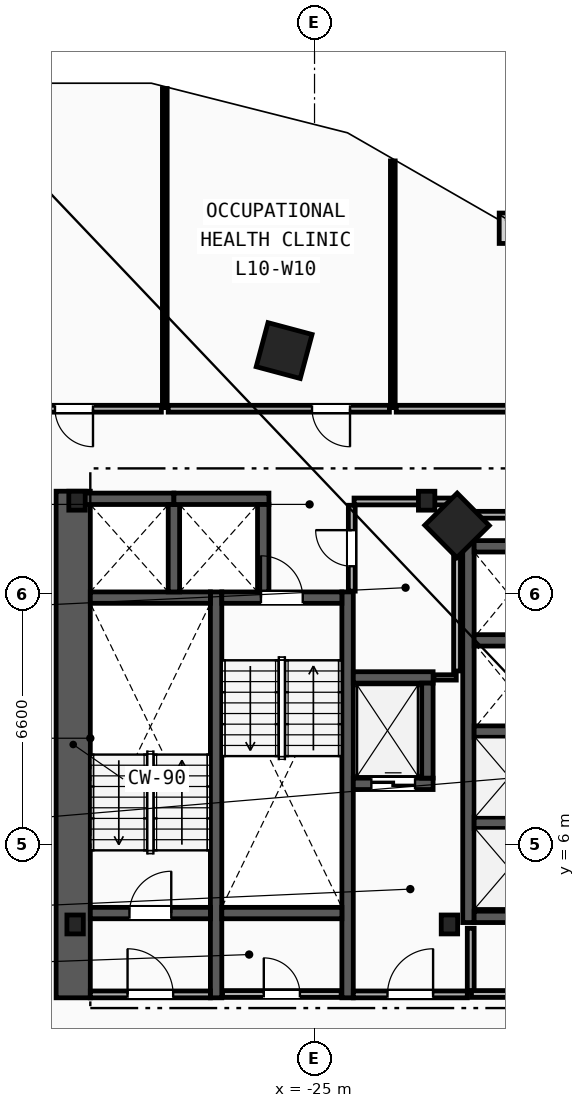
"""IFC4 building model, lengths in metres.
Left out: names, types, materials, properties, quantities, classifications, styles, units other than length and angle.
Written with IfcOpenShell. Run it as: python <this file> out.ifc"""

import sys

from ifc_helpers import new_model, si_unit, direction, frame, frame_2d, origin, origin_2d, place, context, subcontext, project, spatial, rectangle, i_section, extrude, element, fill, save


model = new_model("IFC4")
c1 = context("Model", 3, precision=1e-05, world=origin(), true_north=direction((0.0, 1.0)))
c2 = subcontext(c1, "Body", "Model", "MODEL_VIEW")
j1 = project(units=[si_unit("LENGTHUNIT", "METRE"), si_unit("PLANEANGLEUNIT", "RADIAN")], contexts=[c1])
p1 = place(None, origin())
s1 = spatial("IfcSite", under=j1, at=p1, CompositionType="ELEMENT")
p2 = place(p1, origin())
s2 = spatial("IfcBuilding", under=s1, at=p2, CompositionType="ELEMENT")
p3 = place(p2, frame((0.0, 0.0, 43.0)))
s3 = spatial("IfcBuildingStorey", under=s2, at=p3, CompositionType="ELEMENT", Elevation=43.0)
for number, where, z_axis, x_axis in (
    (1, (-31.3, 3.9, 0.0), (0.0, 0.0, 1.0), (1.0, 0.0, 0.0)),
    (2, (-21.45, 3.9, 0.0), (0.0, 0.0, 1.0), (1.0, 0.0, 0.0)),
    (3, (-22.05, 15.05, 0.0), (0.0, 0.0, 1.0), (1.0, 0.0, 0.0)),
    (4, (-31.25, 15.05, 0.0), (0.0, 0.0, 1.0), (1.0, 0.0, 0.0)),
):
    element("IfcColumn", number, at=place(p3, frame(where, z_axis=z_axis, x_axis=x_axis)), inside=s3, PredefinedType="COLUMN", context=c2, shape_type="SweptSolid", body=[
        extrude(i_section(OverallWidth=0.432, OverallDepth=0.498, WebThickness=0.056, FlangeThickness=0.089, FilletRadius=0.018, at=origin_2d()), origin(), (0.0, 0.0, 1.0), 3.8),
    ])
for number, where, z_axis, x_axis in (
    (5, (-21.25, 14.4, 0.0), (0.0, 0.0, 1.0), (-0.703, 0.711, 0.0)),
    (6, (-25.8, 19.0, 0.0), (0.0, 0.0, 1.0), (-0.966, 0.259, 0.0)),
):
    element("IfcColumn", number, at=place(p3, frame(where, z_axis=z_axis, x_axis=x_axis)), inside=s3, PredefinedType="COLUMN", context=c2, shape_type="SweptSolid", body=[
        extrude(rectangle(XDim=1.2, YDim=1.2, at=origin_2d()), origin(), (0.0, 0.0, 1.0), 3.8),
    ])
p4 = place(p3, frame((-31.35, 1.97, 0.0), z_axis=(0.0, 0.0, 1.0), x_axis=(0.0, 1.0, 0.0)))
e7 = element("IfcWall", 7, at=p4, inside=s3, PredefinedType="SHEAR", context=c2, shape_type="SweptSolid", body=[
    extrude(rectangle(XDim=13.33, YDim=0.9, at=frame_2d((6.665, 0.0))), origin(), (0.0, 0.0, 1.0), 3.5),
])
for number, where, z_axis, x_axis in (
    (8, (-27.59, 1.97, 0.0), (0.0, 0.0, 1.0), (0.0, 1.0, 0.0)),
    (9, (-24.13, 1.97, 0.0), (0.0, 0.0, 1.0), (0.0, 1.0, 0.0)),
):
    element("IfcWall", number, at=place(p3, frame(where, z_axis=z_axis, x_axis=x_axis)), inside=s3, PredefinedType="SHEAR", context=c2, shape_type="SweptSolid", body=[
        extrude(rectangle(XDim=10.68, YDim=0.3, at=frame_2d((5.34, 0.0))), origin(), (0.0, 0.0, 1.0), 3.5),
    ])
p5 = place(p3, frame((-30.9, 4.2, 0.0), z_axis=(0.0, 0.0, 1.0), x_axis=(1.0, 0.0, 0.0)))
e10 = element("IfcWall", 10, at=p5, inside=s3, PredefinedType="SHEAR", context=c2, shape_type="SweptSolid", body=[
    extrude(rectangle(XDim=3.16, YDim=0.3, at=frame_2d((1.58, 0.0))), origin(), (0.0, 0.0, 1.0), 3.5),
])
p6 = place(p5, frame((1.03, 0.0, 0.0)))
e11 = element("IfcOpeningElement", 11, at=p6, cuts=e10, PredefinedType="OPENING", context=c2, shape_type="SweptSolid", body=[
    extrude(rectangle(XDim=1.1, YDim=2.15, at=frame_2d((0.55, 1.075))), frame((0.0, 0.16, 0.0), z_axis=(0.0, -1.0, 0.0), x_axis=(1.0, 0.0, 0.0)), (0.0, 0.0, 1.0), 0.32),
])
p7 = place(p3, frame((-30.9, 12.5, 0.0), z_axis=(0.0, 0.0, 1.0), x_axis=(1.0, 0.0, 0.0)))
e12 = element("IfcWall", 12, at=p7, inside=s3, PredefinedType="SHEAR", context=c2, shape_type="SweptSolid", body=[
    extrude(rectangle(XDim=3.16, YDim=0.3, at=frame_2d((1.58, 0.0))), origin(), (0.0, 0.0, 1.0), 3.5),
])
p8 = place(p3, frame((-27.44, 12.5, 0.0), z_axis=(0.0, 0.0, 1.0), x_axis=(1.0, 0.0, 0.0)))
e13 = element("IfcWall", 13, at=p8, inside=s3, PredefinedType="SHEAR", context=c2, shape_type="SweptSolid", body=[
    extrude(rectangle(XDim=3.16, YDim=0.3, at=frame_2d((1.58, 0.0))), origin(), (0.0, 0.0, 1.0), 3.5),
])
p9 = place(p8, frame((1.03, 0.0, 0.0)))
e14 = element("IfcOpeningElement", 14, at=p9, cuts=e13, PredefinedType="OPENING", context=c2, shape_type="SweptSolid", body=[
    extrude(rectangle(XDim=1.1, YDim=2.15, at=frame_2d((0.55, 1.075))), frame((0.0, 0.16, 0.0), z_axis=(0.0, -1.0, 0.0), x_axis=(1.0, 0.0, 0.0)), (0.0, 0.0, 1.0), 0.32),
])
p10 = place(p3, frame((-27.44, 4.2, 0.0), z_axis=(0.0, 0.0, 1.0), x_axis=(1.0, 0.0, 0.0)))
e15 = element("IfcWall", 15, at=p10, inside=s3, PredefinedType="SHEAR", context=c2, shape_type="SweptSolid", body=[
    extrude(rectangle(XDim=3.16, YDim=0.3, at=frame_2d((1.58, 0.0))), origin(), (0.0, 0.0, 1.0), 3.5),
])
p11 = place(p3, frame((-20.89, 2.15, 0.0), z_axis=(0.0, 0.0, 1.0), x_axis=(0.0, 1.0, 0.0)))
e16 = element("IfcWall", 16, at=p11, inside=s3, PredefinedType="PARTITIONING", context=c2, shape_type="SweptSolid", body=[
    extrude(rectangle(XDim=1.65, YDim=0.18, at=frame_2d((0.825, 0.0))), origin(), (0.0, 0.0, 1.0), 3.5),
])
p12 = place(p3, frame((-23.98, 2.06, 0.0), z_axis=(0.0, 0.0, 1.0), x_axis=(1.0, 0.0, 0.0)))
e17 = element("IfcWall", 17, at=p12, inside=s3, PredefinedType="PARTITIONING", context=c2, shape_type="SweptSolid", body=[
    extrude(rectangle(XDim=3.0, YDim=0.18, at=frame_2d((1.5, 0.0))), origin(), (0.0, 0.0, 1.0), 3.5),
])
p13 = place(p12, frame((0.9, 0.0, 0.0)))
e18 = element("IfcOpeningElement", 18, at=p13, cuts=e17, PredefinedType="OPENING", context=c2, shape_type="SweptSolid", body=[
    extrude(rectangle(XDim=1.2, YDim=2.15, at=frame_2d((0.6, 1.075))), frame((0.0, 0.1, 0.0), z_axis=(0.0, -1.0, 0.0), x_axis=(1.0, 0.0, 0.0)), (0.0, 0.0, 1.0), 0.2),
])
p14 = place(p3, frame((-30.9, 2.06, 0.0), z_axis=(0.0, 0.0, 1.0), x_axis=(1.0, 0.0, 0.0)))
e19 = element("IfcWall", 19, at=p14, inside=s3, PredefinedType="PARTITIONING", context=c2, shape_type="SweptSolid", body=[
    extrude(rectangle(XDim=3.16, YDim=0.18, at=frame_2d((1.58, 0.0))), origin(), (0.0, 0.0, 1.0), 3.5),
])
p15 = place(p14, frame((0.98, 0.0, 0.0)))
e20 = element("IfcOpeningElement", 20, at=p15, cuts=e19, PredefinedType="OPENING", context=c2, shape_type="SweptSolid", body=[
    extrude(rectangle(XDim=1.2, YDim=2.15, at=frame_2d((0.6, 1.075))), frame((0.0, 0.1, 0.0), z_axis=(0.0, -1.0, 0.0), x_axis=(1.0, 0.0, 0.0)), (0.0, 0.0, 1.0), 0.2),
])
p16 = place(p3, frame((-23.98, 7.6, 0.0), z_axis=(0.0, 0.0, 1.0), x_axis=(1.0, 0.0, 0.0)))
e21 = element("IfcWall", 21, at=p16, inside=s3, PredefinedType="SHEAR", context=c2, shape_type="SweptSolid", body=[
    extrude(rectangle(XDim=2.1, YDim=0.3, at=frame_2d((1.05, 0.0))), origin(), (0.0, 0.0, 1.0), 3.5),
])
p17 = place(p16, frame((0.475, 0.0, 0.0)))
e22 = element("IfcOpeningElement", 22, at=p17, cuts=e21, PredefinedType="OPENING", context=c2, shape_type="SweptSolid", body=[
    extrude(rectangle(XDim=1.15, YDim=2.2, at=frame_2d((0.575, 1.1))), frame((0.0, 0.16, 0.0), z_axis=(0.0, -1.0, 0.0), x_axis=(1.0, 0.0, 0.0)), (0.0, 0.0, 1.0), 0.32),
])
p18 = place(p3, frame((-23.98, 10.4, 0.0), z_axis=(0.0, 0.0, 1.0), x_axis=(1.0, 0.0, 0.0)))
e23 = element("IfcWall", 23, at=p18, inside=s3, PredefinedType="SHEAR", context=c2, shape_type="SweptSolid", body=[
    extrude(rectangle(XDim=2.1, YDim=0.3, at=frame_2d((1.05, 0.0))), origin(), (0.0, 0.0, 1.0), 3.5),
])
for number, where, z_axis, x_axis in (
    (24, (-22.03, 7.75, 0.0), (0.0, 0.0, 1.0), (0.0, 1.0, 0.0)),
    (25, (-31.2, 15.1, 0.0), (0.0, 0.0, 1.0), (1.0, 0.0, 0.0)),
):
    element("IfcWall", number, at=place(p3, frame(where, z_axis=z_axis, x_axis=x_axis)), inside=s3, PredefinedType="SHEAR", context=c2, shape_type="SweptSolid", body=[
        extrude(rectangle(XDim=2.5, YDim=0.3, at=frame_2d((1.25, 0.0))), origin(), (0.0, 0.0, 1.0), 3.5),
    ])
p19 = place(p3, frame((-28.7, 12.65, 0.0), z_axis=(0.0, 0.0, 1.0), x_axis=(0.0, 1.0, 0.0)))
e26 = element("IfcWall", 26, at=p19, inside=s3, PredefinedType="SHEAR", context=c2, shape_type="SweptSolid", body=[
    extrude(rectangle(XDim=2.3, YDim=0.3, at=frame_2d((1.15, 0.0))), origin(), (0.0, 0.0, 1.0), 3.5),
])
p20 = place(p3, frame((-28.7, 15.1, 0.0), z_axis=(0.0, 0.0, 1.0), x_axis=(1.0, 0.0, 0.0)))
e27 = element("IfcWall", 27, at=p20, inside=s3, PredefinedType="SHEAR", context=c2, shape_type="SweptSolid", body=[
    extrude(rectangle(XDim=2.5, YDim=0.3, at=frame_2d((1.25, 0.0))), origin(), (0.0, 0.0, 1.0), 3.5),
])
p21 = place(p3, frame((-26.35, 12.65, 0.0), z_axis=(0.0, 0.0, 1.0), x_axis=(0.0, 1.0, 0.0)))
e28 = element("IfcWall", 28, at=p21, inside=s3, PredefinedType="SHEAR", context=c2, shape_type="SweptSolid", body=[
    extrude(rectangle(XDim=2.3, YDim=0.3, at=frame_2d((1.15, 0.0))), origin(), (0.0, 0.0, 1.0), 3.5),
])
p22 = place(p3, frame((-20.95, 3.95, 0.0), z_axis=(0.0, 0.0, 1.0), x_axis=(0.0, 1.0, 0.0)))
e29 = element("IfcWall", 29, at=p22, inside=s3, PredefinedType="SHEAR", context=c2, shape_type="SweptSolid", body=[
    extrude(rectangle(XDim=10.05, YDim=0.3, at=frame_2d((5.025, 0.0))), origin(), (0.0, 0.0, 1.0), 3.5),
])
for number, where, z_axis, x_axis in (
    (30, (-20.8, 4.1, 0.0), (0.0, 0.0, 1.0), (1.0, 0.0, 0.0)),
    (31, (-20.8, 13.85, 0.0), (0.0, 0.0, 1.0), (1.0, 0.0, 0.0)),
):
    element("IfcWall", number, at=place(p3, frame(where, z_axis=z_axis, x_axis=x_axis)), inside=s3, PredefinedType="SHEAR", context=c2, shape_type="SweptSolid", body=[
        extrude(rectangle(XDim=2.15, YDim=0.3, at=frame_2d((1.075, 0.0))), origin(), (0.0, 0.0, 1.0), 3.5),
    ])
for number, where, z_axis, x_axis in (
    (32, (-20.8, 6.575, 0.0), (0.0, 0.0, 1.0), (1.0, 0.0, 0.0)),
    (33, (-20.8, 8.975, 0.0), (0.0, 0.0, 1.0), (1.0, 0.0, 0.0)),
    (34, (-20.8, 11.375, 0.0), (0.0, 0.0, 1.0), (1.0, 0.0, 0.0)),
):
    element("IfcWall", number, at=place(p3, frame(where, z_axis=z_axis, x_axis=x_axis)), inside=s3, PredefinedType="SHEAR", context=c2, shape_type="SweptSolid", body=[
        extrude(rectangle(XDim=1.85, YDim=0.3, at=frame_2d((0.925, 0.0))), origin(), (0.0, 0.0, 1.0), 3.5),
    ])
p23 = place(p3, frame((-20.87, 2.07, 0.0), z_axis=(0.0, 0.0, 1.0), x_axis=(1.0, 0.0, 0.0)))
e35 = element("IfcWall", 35, at=p23, inside=s3, PredefinedType="PARTITIONING", context=c2, shape_type="SweptSolid", body=[
    extrude(rectangle(XDim=3.83, YDim=0.18, at=frame_2d((1.915, 0.0))), origin(), (0.0, 0.0, 1.0), 3.5),
])
p24 = place(p23, frame((1.44, 0.0, 0.0)))
e36 = element("IfcOpeningElement", 36, at=p24, cuts=e35, PredefinedType="OPENING", context=c2, shape_type="SweptSolid", body=[
    extrude(rectangle(XDim=0.95, YDim=2.1, at=frame_2d((0.475, 1.05))), frame((0.0, 0.1, 0.0), z_axis=(0.0, -1.0, 0.0), x_axis=(1.0, 0.0, 0.0)), (0.0, 0.0, 1.0), 0.2),
])
p25 = place(p3, frame((-21.86, 10.4, 0.0), z_axis=(0.0, 0.0, 1.0), x_axis=(1.0, 0.0, 0.0)))
e37 = element("IfcWall", 37, at=p25, inside=s3, PredefinedType="PARTITIONING", context=c2, shape_type="SweptSolid", body=[
    extrude(rectangle(XDim=0.59, YDim=0.14, at=frame_2d((0.295, 0.0))), origin(), (0.0, 0.0, 1.0), 3.5),
])
p26 = place(p3, frame((-21.25, 10.57, 0.0), z_axis=(0.0, 0.0, 1.0), x_axis=(0.0, 1.0, 0.0)))
e38 = element("IfcWall", 38, at=p26, inside=s3, PredefinedType="PARTITIONING", context=c2, shape_type="SweptSolid", body=[
    extrude(rectangle(XDim=4.36, YDim=0.18, at=frame_2d((2.18, 0.0))), origin(), (0.0, 0.0, 1.0), 3.5),
])
p27 = place(p3, frame((-23.96, 15.03, 0.0), z_axis=(0.0, 0.0, 1.0), x_axis=(1.0, 0.0, 0.0)))
e39 = element("IfcWall", 39, at=p27, inside=s3, PredefinedType="PARTITIONING", context=c2, shape_type="SweptSolid", body=[
    extrude(rectangle(XDim=2.61, YDim=0.18, at=frame_2d((1.305, 0.0))), origin(), (0.0, 0.0, 1.0), 2.573),
])
p28 = place(p3, frame((-27.42, 2.07, 0.0), z_axis=(0.0, 0.0, 1.0), x_axis=(1.0, 0.0, 0.0)))
e40 = element("IfcWall", 40, at=p28, inside=s3, PredefinedType="PARTITIONING", context=c2, shape_type="SweptSolid", body=[
    extrude(rectangle(XDim=3.12, YDim=0.18, at=frame_2d((1.56, 0.0))), origin(), (0.0, 0.0, 1.0), 3.5),
])
p29 = place(p28, frame((1.085, 0.0, 0.0)))
e41 = element("IfcOpeningElement", 41, at=p29, cuts=e40, PredefinedType="OPENING", context=c2, shape_type="SweptSolid", body=[
    extrude(rectangle(XDim=0.95, YDim=2.1, at=frame_2d((0.475, 1.05))), frame((0.0, 0.1, 0.0), z_axis=(0.0, -1.0, 0.0), x_axis=(1.0, 0.0, 0.0)), (0.0, 0.0, 1.0), 0.2),
])
p30 = place(p3, frame((-24.02, 12.67, 0.0), z_axis=(0.0, 0.0, 1.0), x_axis=(0.0, 1.0, 0.0)))
e42 = element("IfcWall", 42, at=p30, inside=s3, PredefinedType="PARTITIONING", context=c2, shape_type="SweptSolid", body=[
    extrude(rectangle(XDim=2.26, YDim=0.18, at=frame_2d((1.13, 0.0))), origin(), (0.0, 0.0, 1.0), 3.5),
])
p31 = place(p30, frame((0.655, 0.0, 0.0)))
e43 = element("IfcOpeningElement", 43, at=p31, cuts=e42, PredefinedType="OPENING", context=c2, shape_type="SweptSolid", body=[
    extrude(rectangle(XDim=0.95, YDim=2.1, at=frame_2d((0.475, 1.05))), frame((0.0, 0.1, 0.0), z_axis=(0.0, -1.0, 0.0), x_axis=(1.0, 0.0, 0.0)), (0.0, 0.0, 1.0), 0.2),
])
p32 = place(p3, frame((-28.94, 17.5, 0.0), z_axis=(0.0, 0.0, 1.0), x_axis=(0.0, 1.0, 0.0)))
e44 = element("IfcWall", 44, at=p32, inside=s3, PredefinedType="PARTITIONING", context=c2, shape_type="SweptSolid", body=[
    extrude(rectangle(XDim=8.395, YDim=0.125, at=frame_2d((4.197, 0.0))), origin(), (0.0, 0.0, 1.0), 3.5),
])
p33 = place(p3, frame((-22.94, 17.5, 0.0), z_axis=(0.0, 0.0, 1.0), x_axis=(0.0, 1.0, 0.0)))
e45 = element("IfcWall", 45, at=p33, inside=s3, PredefinedType="PARTITIONING", context=c2, shape_type="SweptSolid", body=[
    extrude(rectangle(XDim=6.49, YDim=0.125, at=frame_2d((3.245, 0.0))), origin(), (0.0, 0.0, 1.0), 3.5),
])
p34 = place(p3, frame((-16.822, 17.47, 0.0), z_axis=(0.0, 0.0, 1.0), x_axis=(-1.0, 0.0, 0.0)))
e46 = element("IfcWall", 46, at=p34, inside=s3, PredefinedType="PARTITIONING", context=c2, shape_type="SweptSolid", body=[
    extrude(rectangle(XDim=6.029, YDim=0.18, at=frame_2d((3.014, 0.0))), origin(), (0.0, 0.0, 1.0), 3.5),
])
p35 = place(p3, frame((-21.178, 14.68, 0.0), z_axis=(0.0, 0.0, 1.0), x_axis=(1.0, 0.0, 0.0)))
e47 = element("IfcWall", 47, at=p35, inside=s3, PredefinedType="PARTITIONING", context=c2, shape_type="SweptSolid", body=[
    extrude(rectangle(XDim=4.357, YDim=0.18, at=frame_2d((2.178, 0.0))), origin(), (0.0, 0.0, 1.0), 3.5),
])
p36 = place(p3, frame((-29.03, 17.47, 0.0), z_axis=(0.0, 0.0, 1.0), x_axis=(-1.0, 0.0, 0.0)))
e48 = element("IfcWall", 48, at=p36, inside=s3, PredefinedType="PARTITIONING", context=c2, shape_type="SweptSolid", body=[
    extrude(rectangle(XDim=4.598, YDim=0.18, at=frame_2d((2.299, 0.0))), origin(), (0.0, 0.0, 1.0), 3.5),
])
p37 = place(p36, frame((1.799, 0.0, 0.0)))
e49 = element("IfcOpeningElement", 49, at=p37, cuts=e48, PredefinedType="OPENING", context=c2, shape_type="SweptSolid", body=[
    extrude(rectangle(XDim=1.0, YDim=2.15, at=frame_2d((0.5, 1.075))), frame((0.0, 0.1, 0.0), z_axis=(0.0, -1.0, 0.0), x_axis=(1.0, 0.0, 0.0)), (0.0, 0.0, 1.0), 0.2),
])
p38 = place(p3, frame((-23.03, 17.47, 0.0), z_axis=(0.0, 0.0, 1.0), x_axis=(-1.0, 0.0, 0.0)))
e50 = element("IfcWall", 50, at=p38, inside=s3, PredefinedType="PARTITIONING", context=c2, shape_type="SweptSolid", body=[
    extrude(rectangle(XDim=5.82, YDim=0.18, at=frame_2d((2.91, 0.0))), origin(), (0.0, 0.0, 1.0), 3.5),
])
p39 = place(p38, frame((1.036, 0.0, 0.0)))
e51 = element("IfcOpeningElement", 51, at=p39, cuts=e50, PredefinedType="OPENING", context=c2, shape_type="SweptSolid", body=[
    extrude(rectangle(XDim=1.0, YDim=2.15, at=frame_2d((0.5, 1.075))), frame((0.0, 0.1, 0.0), z_axis=(0.0, -1.0, 0.0), x_axis=(1.0, 0.0, 0.0)), (0.0, 0.0, 1.0), 0.2),
])
p40 = place(p6, origin())
e52 = element("IfcDoor", 52, at=p40, inside=s3, OperationType="SINGLE_SWING_RIGHT", PredefinedType="DOOR", context=c2, shape_type="SweptSolid", body=[
    extrude(rectangle(XDim=1.1, YDim=2.15, at=frame_2d((0.55, 1.075))), frame((0.0, 0.025, 0.0), z_axis=(0.0, -1.0, 0.0), x_axis=(1.0, 0.0, 0.0)), (0.0, 0.0, 1.0), 0.05),
])
fill(e11, e52)
p41 = place(p9, origin())
e53 = element("IfcDoor", 53, at=p41, inside=s3, OperationType="SINGLE_SWING_LEFT", PredefinedType="DOOR", context=c2, shape_type="SweptSolid", body=[
    extrude(rectangle(XDim=1.1, YDim=2.15, at=frame_2d((0.55, 1.075))), frame((0.0, 0.025, 0.0), z_axis=(0.0, -1.0, 0.0), x_axis=(1.0, 0.0, 0.0)), (0.0, 0.0, 1.0), 0.05),
])
fill(e14, e53)
p42 = place(p13, origin())
e54 = element("IfcDoor", 54, at=p42, inside=s3, OperationType="SINGLE_SWING_RIGHT", PredefinedType="DOOR", context=c2, shape_type="SweptSolid", body=[
    extrude(rectangle(XDim=1.2, YDim=2.15, at=frame_2d((0.6, 1.075))), frame((0.0, 0.025, 0.0), z_axis=(0.0, -1.0, 0.0), x_axis=(1.0, 0.0, 0.0)), (0.0, 0.0, 1.0), 0.05),
])
fill(e18, e54)
p43 = place(p15, origin())
e55 = element("IfcDoor", 55, at=p43, inside=s3, OperationType="SINGLE_SWING_LEFT", PredefinedType="DOOR", context=c2, shape_type="SweptSolid", body=[
    extrude(rectangle(XDim=1.2, YDim=2.15, at=frame_2d((0.6, 1.075))), frame((0.0, 0.025, 0.0), z_axis=(0.0, -1.0, 0.0), x_axis=(1.0, 0.0, 0.0)), (0.0, 0.0, 1.0), 0.05),
])
fill(e20, e55)
p44 = place(p17, origin())
e56 = element("IfcDoor", 56, at=p44, inside=s3, OperationType="SLIDING_TO_LEFT", PredefinedType="TRAPDOOR", context=c2, shape_type="SweptSolid", body=[
    extrude(rectangle(XDim=1.15, YDim=2.2, at=frame_2d((0.575, 1.1))), frame((0.0, 0.025, 0.0), z_axis=(0.0, -1.0, 0.0), x_axis=(1.0, 0.0, 0.0)), (0.0, 0.0, 1.0), 0.05),
])
fill(e22, e56)
p45 = place(p39, origin())
e57 = element("IfcDoor", 57, at=p45, inside=s3, OperationType="SINGLE_SWING_LEFT", PredefinedType="DOOR", context=c2, shape_type="SweptSolid", body=[
    extrude(rectangle(XDim=1.0, YDim=2.15, at=frame_2d((0.5, 1.075))), frame((0.0, 0.025, 0.0), z_axis=(0.0, -1.0, 0.0), x_axis=(1.0, 0.0, 0.0)), (0.0, 0.0, 1.0), 0.05),
])
fill(e51, e57)
p46 = place(p37, origin())
e58 = element("IfcDoor", 58, at=p46, inside=s3, OperationType="SINGLE_SWING_LEFT", PredefinedType="DOOR", context=c2, shape_type="SweptSolid", body=[
    extrude(rectangle(XDim=1.0, YDim=2.15, at=frame_2d((0.5, 1.075))), frame((0.0, 0.025, 0.0), z_axis=(0.0, -1.0, 0.0), x_axis=(1.0, 0.0, 0.0)), (0.0, 0.0, 1.0), 0.05),
])
fill(e49, e58)
p47 = place(p29, origin())
e59 = element("IfcDoor", 59, at=p47, inside=s3, OperationType="SINGLE_SWING_LEFT", PredefinedType="DOOR", context=c2, shape_type="SweptSolid", body=[
    extrude(rectangle(XDim=0.95, YDim=2.1, at=frame_2d((0.475, 1.05))), frame((0.0, 0.025, 0.0), z_axis=(0.0, -1.0, 0.0), x_axis=(1.0, 0.0, 0.0)), (0.0, 0.0, 1.0), 0.05),
])
fill(e41, e59)
p48 = place(p31, origin())
e60 = element("IfcDoor", 60, at=p48, inside=s3, OperationType="SINGLE_SWING_RIGHT", PredefinedType="DOOR", context=c2, shape_type="SweptSolid", body=[
    extrude(rectangle(XDim=0.95, YDim=2.1, at=frame_2d((0.475, 1.05))), frame((0.0, 0.025, 0.0), z_axis=(0.0, -1.0, 0.0), x_axis=(1.0, 0.0, 0.0)), (0.0, 0.0, 1.0), 0.05),
])
fill(e43, e60)
save(model, sys.argv[1])
